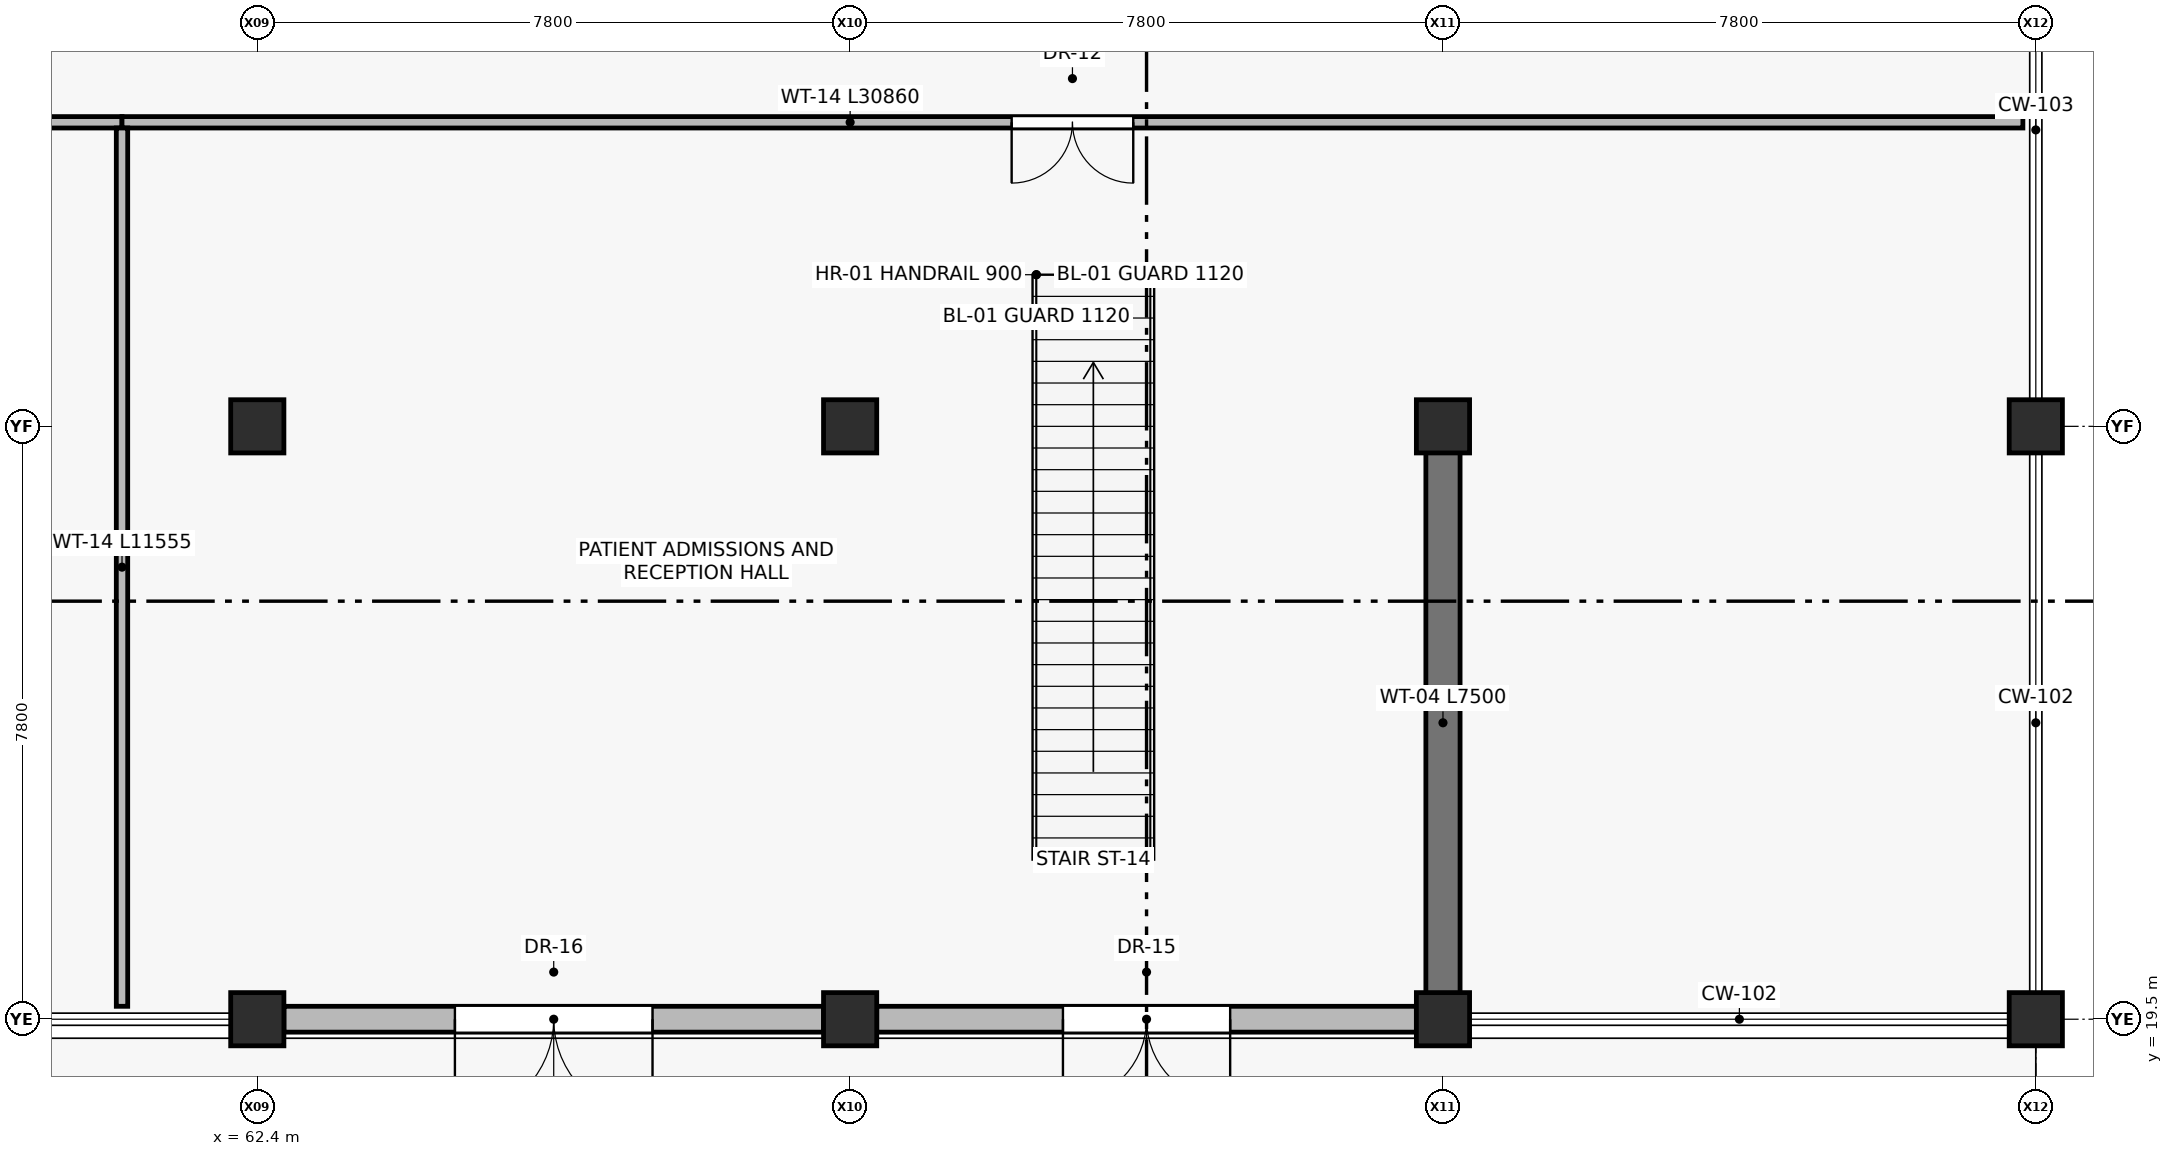
"""IFC4 building model, lengths in metres.
Left out: names, types, materials, properties, quantities, classifications, styles, units other than length and angle.
Written with IfcOpenShell. Run it as: python <this file> out.ifc"""

import sys

from ifc_helpers import new_model, si_unit, direction, frame, frame_2d, origin, origin_2d, place, context, subcontext, project, spatial, rectangle, extrude, element, fill, save


model = new_model("IFC4")
c1 = context("Model", 3, precision=1e-05, world=origin(), true_north=direction((0.0, 1.0)))
c2 = subcontext(c1, "Body", "Model", "MODEL_VIEW")
j1 = project(units=[si_unit("LENGTHUNIT", "METRE"), si_unit("PLANEANGLEUNIT", "RADIAN")], contexts=[c1])
p1 = place(None, origin())
s1 = spatial("IfcSite", under=j1, at=p1, CompositionType="ELEMENT")
p2 = place(p1, origin())
s2 = spatial("IfcBuilding", under=s1, at=p2, CompositionType="ELEMENT")
p3 = place(p2, origin())
s3 = spatial("IfcBuildingStorey", under=s2, at=p3, CompositionType="ELEMENT", Elevation=0.0)
for number, where, z_axis, x_axis in (
    (1, (62.4, 19.5, 0.0), (0.0, 0.0, 1.0), (1.0, 0.0, 0.0)),
    (2, (62.4, 27.3, 0.0), (0.0, 0.0, 1.0), (1.0, 0.0, 0.0)),
    (3, (70.2, 19.5, 0.0), (0.0, 0.0, 1.0), (1.0, 0.0, 0.0)),
    (4, (70.2, 27.3, 0.0), (0.0, 0.0, 1.0), (1.0, 0.0, 0.0)),
    (5, (78.0, 19.5, 0.0), (0.0, 0.0, 1.0), (1.0, 0.0, 0.0)),
    (6, (78.0, 27.3, 0.0), (0.0, 0.0, 1.0), (1.0, 0.0, 0.0)),
    (7, (85.8, 19.5, 0.0), (0.0, 0.0, 1.0), (1.0, 0.0, 0.0)),
    (8, (85.8, 27.3, 0.0), (0.0, 0.0, 1.0), (1.0, 0.0, 0.0)),
):
    element("IfcColumn", number, at=place(p3, frame(where, z_axis=z_axis, x_axis=x_axis)), inside=s3, PredefinedType="COLUMN", context=c2, shape_type="SweptSolid", body=[
        extrude(rectangle(XDim=0.7, YDim=0.7, at=origin_2d()), origin(), (0.0, 0.0, 1.0), 4.8),
    ])
p4 = place(p3, frame((69.85, 19.5, 0.0), z_axis=(0.0, 0.0, 1.0), x_axis=(-1.0, 0.0, 0.0)))
e9 = element("IfcWall", 9, at=p4, inside=s3, PredefinedType="STANDARD", context=c2, shape_type="SweptSolid", body=[
    extrude(rectangle(XDim=7.1, YDim=0.34, at=frame_2d((3.55, 0.0))), origin(), (0.0, 0.0, 1.0), 3.35),
])
p5 = place(p4, frame((2.25, 0.0, 0.0)))
e10 = element("IfcOpeningElement", 10, at=p5, cuts=e9, PredefinedType="OPENING", context=c2, shape_type="SweptSolid", body=[
    extrude(rectangle(XDim=2.6, YDim=2.6, at=frame_2d((1.3, 1.3))), frame((0.0, 0.18, 0.0), z_axis=(0.0, -1.0, 0.0), x_axis=(1.0, 0.0, 0.0)), (0.0, 0.0, 1.0), 0.36),
])
p6 = place(p3, frame((77.65, 19.5, 0.0), z_axis=(0.0, 0.0, 1.0), x_axis=(-1.0, 0.0, 0.0)))
e11 = element("IfcWall", 11, at=p6, inside=s3, PredefinedType="STANDARD", context=c2, shape_type="SweptSolid", body=[
    extrude(rectangle(XDim=7.1, YDim=0.34, at=frame_2d((3.55, 0.0))), origin(), (0.0, 0.0, 1.0), 3.35),
])
p7 = place(p6, frame((2.45, 0.0, 0.0)))
e12 = element("IfcOpeningElement", 12, at=p7, cuts=e11, PredefinedType="OPENING", context=c2, shape_type="SweptSolid", body=[
    extrude(rectangle(XDim=2.2, YDim=2.4, at=frame_2d((1.1, 1.2))), frame((0.0, 0.18, 0.0), z_axis=(0.0, -1.0, 0.0), x_axis=(1.0, 0.0, 0.0)), (0.0, 0.0, 1.0), 0.36),
])
p8 = place(p3, frame((78.0, 19.65, 0.0), z_axis=(0.0, 0.0, 1.0), x_axis=(0.0, 1.0, 0.0)))
e13 = element("IfcWall", 13, at=p8, inside=s3, PredefinedType="SHEAR", context=c2, shape_type="SweptSolid", body=[
    extrude(rectangle(XDim=7.5, YDim=0.45, at=frame_2d((3.75, 0.0))), origin(), (0.0, 0.0, 1.0), 4.54),
])
p9 = place(p3, frame((60.62, 31.3, 0.0), z_axis=(0.0, 0.0, 1.0), x_axis=(-1.0, 0.0, 0.0)))
e14 = element("IfcWall", 14, at=p9, inside=s3, PredefinedType="PARTITIONING", context=c2, shape_type="SweptSolid", body=[
    extrude(rectangle(XDim=5.85, YDim=0.15, at=frame_2d((2.925, 0.0))), origin(), (0.0, 0.0, 1.0), 4.54),
])
p10 = place(p9, frame((2.125, 0.0, 0.0)))
e15 = element("IfcOpeningElement", 15, at=p10, cuts=e14, PredefinedType="OPENING", context=c2, shape_type="SweptSolid", body=[
    extrude(rectangle(XDim=1.6, YDim=2.2, at=frame_2d((0.8, 1.1))), frame((0.0, 0.085, 0.0), z_axis=(0.0, -1.0, 0.0), x_axis=(1.0, 0.0, 0.0)), (0.0, 0.0, 1.0), 0.17),
])
p11 = place(p3, frame((85.63, 31.3, 0.0), z_axis=(0.0, 0.0, 1.0), x_axis=(-1.0, 0.0, 0.0)))
e16 = element("IfcWall", 16, at=p11, inside=s3, PredefinedType="PARTITIONING", context=c2, shape_type="SweptSolid", body=[
    extrude(rectangle(XDim=25.01, YDim=0.15, at=frame_2d((12.505, 0.0))), origin(), (0.0, 0.0, 1.0), 4.54),
])
p12 = place(p11, frame((11.705, 0.0, 0.0)))
e17 = element("IfcOpeningElement", 17, at=p12, cuts=e16, PredefinedType="OPENING", context=c2, shape_type="SweptSolid", body=[
    extrude(rectangle(XDim=1.6, YDim=2.2, at=frame_2d((0.8, 1.1))), frame((0.0, 0.085, 0.0), z_axis=(0.0, -1.0, 0.0), x_axis=(1.0, 0.0, 0.0)), (0.0, 0.0, 1.0), 0.17),
])
p13 = place(p3, frame((60.62, 19.67, 0.0), z_axis=(0.0, 0.0, 1.0), x_axis=(0.0, 1.0, 0.0)))
e18 = element("IfcWall", 18, at=p13, inside=s3, PredefinedType="PARTITIONING", context=c2, shape_type="SweptSolid", body=[
    extrude(rectangle(XDim=11.555, YDim=0.15, at=frame_2d((5.778, 0.0))), origin(), (0.0, 0.0, 1.0), 4.54),
])
p14 = place(p5, origin())
e19 = element("IfcDoor", 19, at=p14, inside=s3, OperationType="DOUBLE_DOOR_SINGLE_SWING", PredefinedType="DOOR", context=c2, shape_type="SweptSolid", body=[
    extrude(rectangle(XDim=2.6, YDim=2.6, at=frame_2d((1.3, 1.3))), frame((0.0, 0.025, 0.0), z_axis=(0.0, -1.0, 0.0), x_axis=(1.0, 0.0, 0.0)), (0.0, 0.0, 1.0), 0.05),
])
fill(e10, e19)
p15 = place(p7, origin())
e20 = element("IfcDoor", 20, at=p15, inside=s3, OperationType="DOUBLE_DOOR_SINGLE_SWING", PredefinedType="DOOR", context=c2, shape_type="SweptSolid", body=[
    extrude(rectangle(XDim=2.2, YDim=2.4, at=frame_2d((1.1, 1.2))), frame((0.0, 0.025, 0.0), z_axis=(0.0, -1.0, 0.0), x_axis=(1.0, 0.0, 0.0)), (0.0, 0.0, 1.0), 0.05),
])
fill(e12, e20)
p16 = place(p12, origin())
e21 = element("IfcDoor", 21, at=p16, inside=s3, OperationType="DOUBLE_DOOR_SINGLE_SWING", PredefinedType="DOOR", context=c2, shape_type="SweptSolid", body=[
    extrude(rectangle(XDim=1.6, YDim=2.2, at=frame_2d((0.8, 1.1))), frame((0.0, 0.025, 0.0), z_axis=(0.0, -1.0, 0.0), x_axis=(1.0, 0.0, 0.0)), (0.0, 0.0, 1.0), 0.05),
])
fill(e17, e21)
save(model, sys.argv[1])
